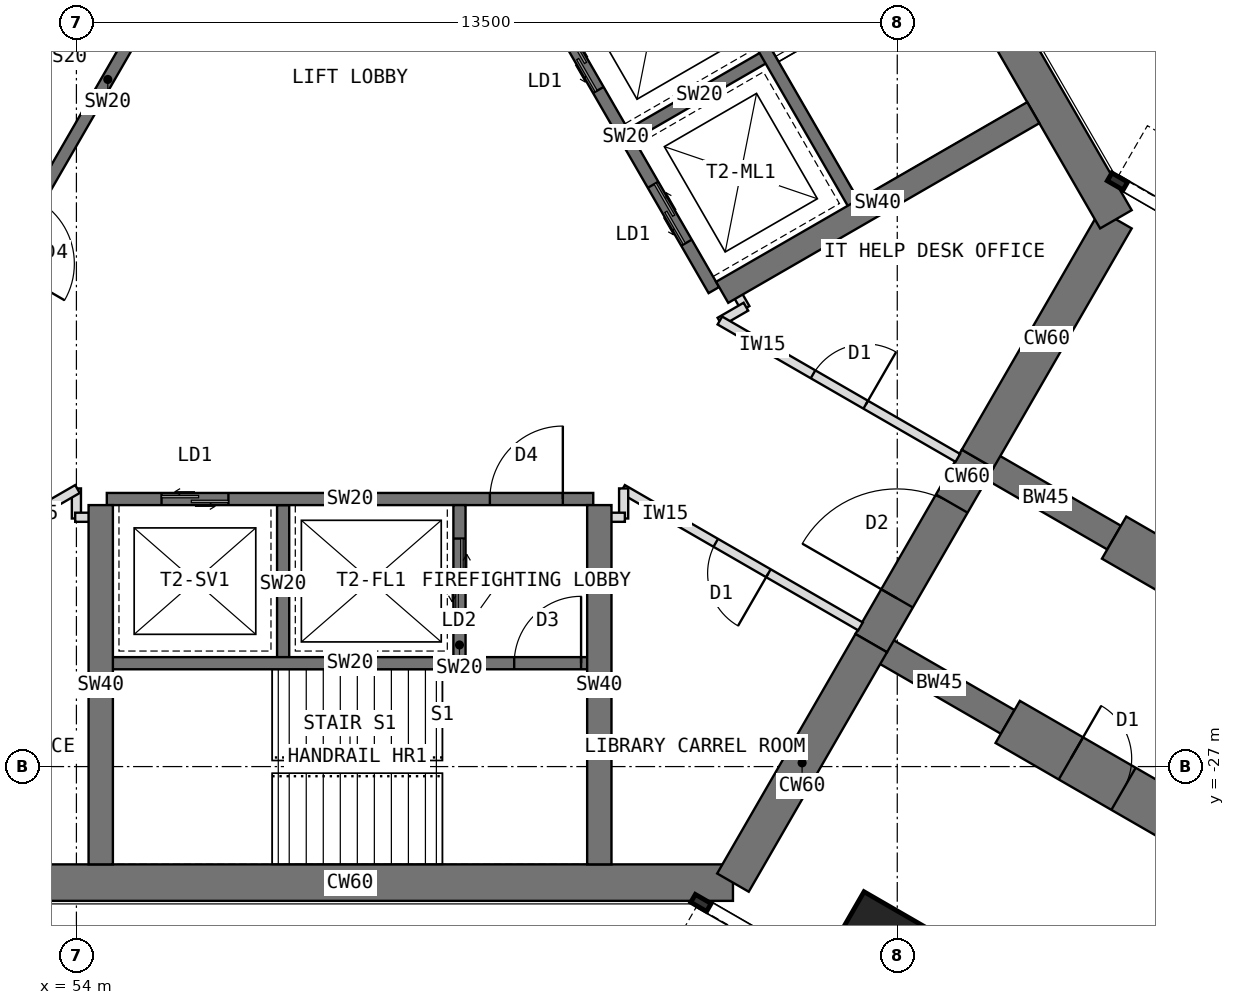
"""IFC4 building model, lengths in metres.
Left out: names, types, materials, properties, quantities, classifications, styles, units other than length and angle.
Written with IfcOpenShell. Run it as: python <this file> out.ifc"""

import sys

from ifc_helpers import new_model, si_unit, direction, frame, frame_2d, origin, origin_2d, place, context, subcontext, project, spatial, rectangle, extrude, element, fill, save


model = new_model("IFC4")
c1 = context("Model", 3, precision=1e-05, world=origin(), true_north=direction((0.0, 1.0)))
c2 = subcontext(c1, "Body", "Model", "MODEL_VIEW")
j1 = project(units=[si_unit("LENGTHUNIT", "METRE"), si_unit("PLANEANGLEUNIT", "RADIAN")], contexts=[c1])
p1 = place(None, origin())
s1 = spatial("IfcSite", under=j1, at=p1, CompositionType="ELEMENT")
p2 = place(p1, origin())
s2 = spatial("IfcBuilding", under=s1, at=p2, CompositionType="ELEMENT")
p3 = place(p2, frame((0.0, 0.0, 125.5)))
s3 = spatial("IfcBuildingStorey", under=s2, at=p3, CompositionType="ELEMENT", Elevation=125.5)
p4 = place(p3, frame((52.202, -28.908, 0.0), z_axis=(0.0, 0.0, 1.0), x_axis=(1.0, 0.0, 0.0)))
e1 = element("IfcWall", 1, at=p4, inside=s3, PredefinedType="SHEAR", context=c2, shape_type="SweptSolid", body=[
    extrude(rectangle(XDim=12.596, YDim=0.6, at=frame_2d((6.298, 0.0))), origin(), (0.0, 0.0, 1.0), 4.0),
])
p5 = place(p3, frame((64.798, -28.908, 0.0), z_axis=(0.0, 0.0, 1.0), x_axis=(0.499984222037, 0.866034513004, 0.0)))
e2 = element("IfcWall", 2, at=p5, inside=s3, PredefinedType="SHEAR", context=c2, shape_type="SweptSolid", body=[
    extrude(rectangle(XDim=4.548, YDim=0.6, at=frame_2d((2.274, 0.0))), origin(), (0.0, 0.0, 1.0), 4.0),
])
p6 = place(p3, frame((67.072, -24.97, 0.0), z_axis=(0.0, 0.0, 1.0), x_axis=(0.500010275428, 0.866019471182, 0.0)))
e3 = element("IfcWall", 3, at=p6, inside=s3, PredefinedType="SHEAR", context=c2, shape_type="SweptSolid", body=[
    extrude(rectangle(XDim=3.5, YDim=0.6, at=frame_2d((1.75, 0.0))), origin(), (0.0, 0.0, 1.0), 4.0),
])
p7 = place(p6, frame((0.85, 0.0, 0.0)))
e4 = element("IfcOpeningElement", 4, at=p7, cuts=e3, PredefinedType="OPENING", context=c2, shape_type="SweptSolid", body=[
    extrude(rectangle(XDim=1.8, YDim=2.1, at=frame_2d((0.9, 1.05))), frame((0.0, 0.31, 0.0), z_axis=(0.0, -1.0, 0.0), x_axis=(1.0, 0.0, 0.0)), (0.0, 0.0, 1.0), 0.62),
])
p8 = place(p3, frame((68.822, -21.939, 0.0), z_axis=(0.0, 0.0, 1.0), x_axis=(0.500024481964, 0.866011268655, 0.0)))
e5 = element("IfcWall", 5, at=p8, inside=s3, PredefinedType="SHEAR", context=c2, shape_type="SweptSolid", body=[
    extrude(rectangle(XDim=4.548, YDim=0.6, at=frame_2d((2.274, 0.0))), origin(), (0.0, 0.0, 1.0), 4.0),
])
p9 = place(p3, frame((71.096, -18.0, 0.0), z_axis=(0.0, 0.0, 1.0), x_axis=(-0.500005998175, 0.866021940709, 0.0)))
e6 = element("IfcWall", 6, at=p9, inside=s3, PredefinedType="SHEAR", context=c2, shape_type="SweptSolid", body=[
    extrude(rectangle(XDim=12.596, YDim=0.6, at=frame_2d((6.298, 0.0))), origin(), (0.0, 0.0, 1.0), 4.0),
])
p10 = place(p3, frame((68.822, -21.939, 0.0), z_axis=(0.0, 0.0, 1.0), x_axis=(0.866072649678, -0.499918158782, 0.0)))
e7 = element("IfcWall", 7, at=p10, inside=s3, PredefinedType="SHEAR", context=c2, shape_type="SweptSolid", body=[
    extrude(rectangle(XDim=2.592, YDim=0.45, at=frame_2d((1.296, 0.0))), origin(), (0.0, 0.0, 1.0), 4.0),
])
p11 = place(p3, frame((71.066, -23.234, 0.0), z_axis=(0.0, 0.0, 1.0), x_axis=(0.86602681393, -0.499997557548, 0.0)))
e8 = element("IfcWall", 8, at=p11, inside=s3, PredefinedType="SHEAR", context=c2, shape_type="SweptSolid", body=[
    extrude(rectangle(XDim=9.5, YDim=0.8, at=frame_2d((4.75, 0.0))), origin(), (0.0, 0.0, 1.0), 4.0),
])
p12 = place(p11, frame((1.2, 0.0, 0.0)))
e9 = element("IfcOpeningElement", 9, at=p12, cuts=e8, PredefinedType="OPENING", context=c2, shape_type="SweptSolid", body=[
    extrude(rectangle(XDim=1.0, YDim=2.1, at=frame_2d((0.5, 1.05))), frame((0.0, 0.41, 0.0), z_axis=(0.0, -1.0, 0.0), x_axis=(1.0, 0.0, 0.0)), (0.0, 0.0, 1.0), 0.82),
])
p13 = place(p3, frame((67.072, -24.97, 0.0), z_axis=(0.0, 0.0, 1.0), x_axis=(0.866031863473, -0.499988811324, 0.0)))
e10 = element("IfcWall", 10, at=p13, inside=s3, PredefinedType="SHEAR", context=c2, shape_type="SweptSolid", body=[
    extrude(rectangle(XDim=2.592, YDim=0.45, at=frame_2d((1.296, 0.0))), origin(), (0.0, 0.0, 1.0), 4.0),
])
p14 = place(p3, frame((69.316, -26.266, 0.0), z_axis=(0.0, 0.0, 1.0), x_axis=(0.86602681393, -0.499997557548, 0.0)))
e11 = element("IfcWall", 11, at=p14, inside=s3, PredefinedType="SHEAR", context=c2, shape_type="SweptSolid", body=[
    extrude(rectangle(XDim=9.5, YDim=0.8, at=frame_2d((4.75, 0.0))), origin(), (0.0, 0.0, 1.0), 4.0),
])
p15 = place(p14, frame((1.2, 0.0, 0.0)))
e12 = element("IfcOpeningElement", 12, at=p15, cuts=e11, PredefinedType="OPENING", context=c2, shape_type="SweptSolid", body=[
    extrude(rectangle(XDim=1.0, YDim=2.1, at=frame_2d((0.5, 1.05))), frame((0.0, 0.41, 0.0), z_axis=(0.0, -1.0, 0.0), x_axis=(1.0, 0.0, 0.0)), (0.0, 0.0, 1.0), 0.82),
])
p16 = place(p3, frame((67.191, -29.946, 0.0), z_axis=(0.0, 0.0, 1.0), x_axis=(0.5, 0.866025403784, 0.0)))
e13 = element("IfcColumn", 13, at=p16, inside=s3, PredefinedType="COLUMN", context=c2, shape_type="SweptSolid", body=[
    extrude(rectangle(XDim=1.3, YDim=1.3, at=origin_2d()), origin(), (0.0, 0.0, 1.0), 4.0),
])
p17 = place(p3, frame((56.516, -12.236, 0.0), z_axis=(0.0, 0.0, 1.0), x_axis=(-0.49999894854, -0.866026010844, 0.0)))
e14 = element("IfcWall", 14, at=p17, inside=s3, PredefinedType="SHEAR", context=c2, shape_type="SweptSolid", body=[
    extrude(rectangle(XDim=8.0, YDim=0.2, at=frame_2d((4.0, 0.0))), origin(), (0.0, 0.0, 1.0), 4.0),
])
p18 = place(p17, frame((6.3, 0.0, 0.0)))
e15 = element("IfcOpeningElement", 15, at=p18, cuts=e14, PredefinedType="OPENING", context=c2, shape_type="SweptSolid", body=[
    extrude(rectangle(XDim=1.2, YDim=2.1, at=frame_2d((0.6, 1.05))), frame((0.0, 0.11, 0.0), z_axis=(0.0, -1.0, 0.0), x_axis=(1.0, 0.0, 0.0)), (0.0, 0.0, 1.0), 0.22),
])
p19 = place(p3, frame((54.178, -10.886, 0.0), z_axis=(0.0, 0.0, 1.0), x_axis=(-0.49999894854, -0.866026010844, 0.0)))
e16 = element("IfcWall", 16, at=p19, inside=s3, PredefinedType="SHEAR", context=c2, shape_type="SweptSolid", body=[
    extrude(rectangle(XDim=8.0, YDim=0.2, at=frame_2d((4.0, 0.0))), origin(), (0.0, 0.0, 1.0), 4.0),
])
p20 = place(p19, frame((6.8, 0.0, 0.0)))
e17 = element("IfcOpeningElement", 17, at=p20, cuts=e16, PredefinedType="OPENING", context=c2, shape_type="SweptSolid", body=[
    extrude(rectangle(XDim=0.9, YDim=2.1, at=frame_2d((0.45, 1.05))), frame((0.0, 0.11, 0.0), z_axis=(0.0, -1.0, 0.0), x_axis=(1.0, 0.0, 0.0)), (0.0, 0.0, 1.0), 0.22),
])
p21 = place(p3, frame((54.5, -22.6, 0.0), z_axis=(0.0, 0.0, 1.0), x_axis=(1.0, 0.0, 0.0)))
e18 = element("IfcWall", 18, at=p21, inside=s3, PredefinedType="SHEAR", context=c2, shape_type="SweptSolid", body=[
    extrude(rectangle(XDim=8.0, YDim=0.2, at=frame_2d((4.0, 0.0))), origin(), (0.0, 0.0, 1.0), 4.0),
])
p22 = place(p21, frame((6.3, 0.0, 0.0)))
e19 = element("IfcOpeningElement", 19, at=p22, cuts=e18, PredefinedType="OPENING", context=c2, shape_type="SweptSolid", body=[
    extrude(rectangle(XDim=1.2, YDim=2.1, at=frame_2d((0.6, 1.05))), frame((0.0, 0.11, 0.0), z_axis=(0.0, -1.0, 0.0), x_axis=(1.0, 0.0, 0.0)), (0.0, 0.0, 1.0), 0.22),
])
p23 = place(p21, frame((0.9, 0.0, 0.0)))
e20 = element("IfcOpeningElement", 20, at=p23, cuts=e18, PredefinedType="OPENING", context=c2, shape_type="SweptSolid", body=[
    extrude(rectangle(XDim=1.1, YDim=2.2, at=frame_2d((0.55, 1.1))), frame((0.0, 0.11, 0.0), z_axis=(0.0, -1.0, 0.0), x_axis=(1.0, 0.0, 0.0)), (0.0, 0.0, 1.0), 0.22),
])
p24 = place(p3, frame((57.4, -22.7, 0.0), z_axis=(0.0, 0.0, 1.0), x_axis=(0.0, -1.0, 0.0)))
e21 = element("IfcWall", 21, at=p24, inside=s3, PredefinedType="SHEAR", context=c2, shape_type="SweptSolid", body=[
    extrude(rectangle(XDim=2.6, YDim=0.2, at=frame_2d((1.3, 0.0))), origin(), (0.0, 0.0, 1.0), 4.0),
])
p25 = place(p3, frame((60.3, -22.7, 0.0), z_axis=(0.0, 0.0, 1.0), x_axis=(0.0, -1.0, 0.0)))
e22 = element("IfcWall", 22, at=p25, inside=s3, PredefinedType="SHEAR", context=c2, shape_type="SweptSolid", body=[
    extrude(rectangle(XDim=2.6, YDim=0.2, at=frame_2d((1.3, 0.0))), origin(), (0.0, 0.0, 1.0), 4.0),
])
p26 = place(p25, frame((0.55, 0.0, 0.0)))
e23 = element("IfcOpeningElement", 23, at=p26, cuts=e22, PredefinedType="OPENING", context=c2, shape_type="SweptSolid", body=[
    extrude(rectangle(XDim=1.3, YDim=2.2, at=frame_2d((0.65, 1.1))), frame((0.0, 0.11, 0.0), z_axis=(0.0, -1.0, 0.0), x_axis=(1.0, 0.0, 0.0)), (0.0, 0.0, 1.0), 0.22),
])
p27 = place(p3, frame((54.5, -25.3, 0.0), z_axis=(0.0, 0.0, 1.0), x_axis=(1.0, 0.0, 0.0)))
e24 = element("IfcWall", 24, at=p27, inside=s3, PredefinedType="SHEAR", context=c2, shape_type="SweptSolid", body=[
    extrude(rectangle(XDim=8.0, YDim=0.2, at=frame_2d((4.0, 0.0))), origin(), (0.0, 0.0, 1.0), 4.0),
])
p28 = place(p27, frame((6.7, 0.0, 0.0)))
e25 = element("IfcOpeningElement", 25, at=p28, cuts=e24, PredefinedType="OPENING", context=c2, shape_type="SweptSolid", body=[
    extrude(rectangle(XDim=1.1, YDim=2.1, at=frame_2d((0.55, 1.05))), frame((0.0, 0.11, 0.0), z_axis=(0.0, -1.0, 0.0), x_axis=(1.0, 0.0, 0.0)), (0.0, 0.0, 1.0), 0.22),
])
for number, where, z_axis, x_axis in (
    (26, (62.6, -22.7, 0.0), (0.0, 0.0, 1.0), (0.0, -1.0, 0.0)),
    (27, (54.4, -22.7, 0.0), (0.0, 0.0, 1.0), (0.0, -1.0, 0.0)),
):
    element("IfcWall", number, at=place(p3, frame(where, z_axis=z_axis, x_axis=x_axis)), inside=s3, PredefinedType="SHEAR", context=c2, shape_type="SweptSolid", body=[
        extrude(rectangle(XDim=5.908, YDim=0.4, at=frame_2d((2.954, 0.0))), origin(), (0.0, 0.0, 1.0), 4.0),
    ])
p29 = place(p3, frame((64.484, -19.164, 0.0), z_axis=(0.0, 0.0, 1.0), x_axis=(-0.49999894854, 0.866026010844, 0.0)))
e28 = element("IfcWall", 28, at=p29, inside=s3, PredefinedType="SHEAR", context=c2, shape_type="SweptSolid", body=[
    extrude(rectangle(XDim=8.0, YDim=0.2, at=frame_2d((4.0, 0.0))), origin(), (0.0, 0.0, 1.0), 4.0),
])
p30 = place(p29, frame((6.3, 0.0, 0.0)))
e29 = element("IfcOpeningElement", 29, at=p30, cuts=e28, PredefinedType="OPENING", context=c2, shape_type="SweptSolid", body=[
    extrude(rectangle(XDim=1.2, YDim=2.1, at=frame_2d((0.6, 1.05))), frame((0.0, 0.11, 0.0), z_axis=(0.0, -1.0, 0.0), x_axis=(1.0, 0.0, 0.0)), (0.0, 0.0, 1.0), 0.22),
])
p31 = place(p29, frame((0.9, 0.0, 0.0)))
e30 = element("IfcOpeningElement", 30, at=p31, cuts=e28, PredefinedType="OPENING", context=c2, shape_type="SweptSolid", body=[
    extrude(rectangle(XDim=1.1, YDim=2.2, at=frame_2d((0.55, 1.1))), frame((0.0, 0.11, 0.0), z_axis=(0.0, -1.0, 0.0), x_axis=(1.0, 0.0, 0.0)), (0.0, 0.0, 1.0), 0.22),
])
p32 = place(p29, frame((3.8, 0.0, 0.0)))
e31 = element("IfcOpeningElement", 31, at=p32, cuts=e28, PredefinedType="OPENING", context=c2, shape_type="SweptSolid", body=[
    extrude(rectangle(XDim=1.1, YDim=2.2, at=frame_2d((0.55, 1.1))), frame((0.0, 0.11, 0.0), z_axis=(0.0, -1.0, 0.0), x_axis=(1.0, 0.0, 0.0)), (0.0, 0.0, 1.0), 0.22),
])
p33 = place(p3, frame((63.12, -16.603, 0.0), z_axis=(0.0, 0.0, 1.0), x_axis=(0.866062058628, 0.499936506574, 0.0)))
e32 = element("IfcWall", 32, at=p33, inside=s3, PredefinedType="SHEAR", context=c2, shape_type="SweptSolid", body=[
    extrude(rectangle(XDim=2.6, YDim=0.2, at=frame_2d((1.3, 0.0))), origin(), (0.0, 0.0, 1.0), 4.0),
])
p34 = place(p3, frame((66.822, -17.814, 0.0), z_axis=(0.0, 0.0, 1.0), x_axis=(-0.49999894854, 0.866026010844, 0.0)))
e33 = element("IfcWall", 33, at=p34, inside=s3, PredefinedType="SHEAR", context=c2, shape_type="SweptSolid", body=[
    extrude(rectangle(XDim=8.0, YDim=0.2, at=frame_2d((4.0, 0.0))), origin(), (0.0, 0.0, 1.0), 4.0),
])
p35 = place(p34, frame((6.7, 0.0, 0.0)))
e34 = element("IfcOpeningElement", 34, at=p35, cuts=e33, PredefinedType="OPENING", context=c2, shape_type="SweptSolid", body=[
    extrude(rectangle(XDim=1.1, YDim=2.1, at=frame_2d((0.55, 1.05))), frame((0.0, 0.11, 0.0), z_axis=(0.0, -1.0, 0.0), x_axis=(1.0, 0.0, 0.0)), (0.0, 0.0, 1.0), 0.22),
])
p36 = place(p3, frame((64.62, -19.201, 0.0), z_axis=(0.0, 0.0, 1.0), x_axis=(0.866027317282, 0.49999668571, 0.0)))
e35 = element("IfcWall", 35, at=p36, inside=s3, PredefinedType="SHEAR", context=c2, shape_type="SweptSolid", body=[
    extrude(rectangle(XDim=5.908, YDim=0.4, at=frame_2d((2.954, 0.0))), origin(), (0.0, 0.0, 1.0), 4.0),
])
p37 = place(p3, frame((54.0, -22.92, 0.0), z_axis=(0.0, 0.0, 1.0), x_axis=(0.0, 1.0, 0.0)))
e36 = element("IfcWall", 36, at=p37, inside=s3, PredefinedType="PARTITIONING", context=c2, shape_type="SweptSolid", body=[
    extrude(rectangle(XDim=0.494, YDim=0.15, at=frame_2d((0.247, 0.0))), origin(), (0.0, 0.0, 1.0), 3.8),
])
p38 = place(p3, frame((54.017, -22.436, 0.0), z_axis=(0.0, 0.0, 1.0), x_axis=(-0.86602002524, -0.500009315796, 0.0)))
e37 = element("IfcWall", 37, at=p38, inside=s3, PredefinedType="PARTITIONING", context=c2, shape_type="SweptSolid", body=[
    extrude(rectangle(XDim=4.519, YDim=0.15, at=frame_2d((2.259, 0.0))), origin(), (0.0, 0.0, 1.0), 3.8),
])
p39 = place(p38, frame((1.769, 0.0, 0.0)))
e38 = element("IfcOpeningElement", 38, at=p39, cuts=e37, PredefinedType="OPENING", context=c2, shape_type="SweptSolid", body=[
    extrude(rectangle(XDim=1.0, YDim=2.1, at=frame_2d((0.5, 1.05))), frame((0.0, 0.085, 0.0), z_axis=(0.0, -1.0, 0.0), x_axis=(1.0, 0.0, 0.0)), (0.0, 0.0, 1.0), 0.17),
])
p40 = place(p3, frame((64.789, -19.092, 0.0), z_axis=(0.0, 0.0, 1.0), x_axis=(0.499804398801, -0.866138304741, 0.0)))
e39 = element("IfcWall", 39, at=p40, inside=s3, PredefinedType="PARTITIONING", context=c2, shape_type="SweptSolid", body=[
    extrude(rectangle(XDim=0.43, YDim=0.15, at=frame_2d((0.215, 0.0))), origin(), (0.0, 0.0, 1.0), 3.8),
])
p41 = place(p3, frame((65.011, -19.437, 0.0), z_axis=(0.0, 0.0, 1.0), x_axis=(-0.865831790172, -0.50033519877, 0.0)))
e40 = element("IfcWall", 40, at=p41, inside=s3, PredefinedType="PARTITIONING", context=c2, shape_type="SweptSolid", body=[
    extrude(rectangle(XDim=0.494, YDim=0.15, at=frame_2d((0.247, 0.0))), origin(), (0.0, 0.0, 1.0), 3.8),
])
p42 = place(p3, frame((64.583, -19.664, 0.0), z_axis=(0.0, 0.0, 1.0), x_axis=(0.866006515865, -0.500032713409, 0.0)))
e41 = element("IfcWall", 41, at=p42, inside=s3, PredefinedType="PARTITIONING", context=c2, shape_type="SweptSolid", body=[
    extrude(rectangle(XDim=4.518, YDim=0.15, at=frame_2d((2.259, 0.0))), origin(), (0.0, 0.0, 1.0), 3.8),
])
p43 = place(p42, frame((1.769, 0.0, 0.0)))
e42 = element("IfcOpeningElement", 42, at=p43, cuts=e41, PredefinedType="OPENING", context=c2, shape_type="SweptSolid", body=[
    extrude(rectangle(XDim=1.0, YDim=2.1, at=frame_2d((0.5, 1.05))), frame((0.0, 0.085, 0.0), z_axis=(0.0, -1.0, 0.0), x_axis=(1.0, 0.0, 0.0)), (0.0, 0.0, 1.0), 0.17),
])
p44 = place(p3, frame((66.896, -24.695, 0.0), z_axis=(0.0, 0.0, 1.0), x_axis=(-0.86602002524, 0.500009315796, 0.0)))
e43 = element("IfcWall", 43, at=p44, inside=s3, PredefinedType="PARTITIONING", context=c2, shape_type="SweptSolid", body=[
    extrude(rectangle(XDim=4.519, YDim=0.15, at=frame_2d((2.259, 0.0))), origin(), (0.0, 0.0, 1.0), 3.8),
])
p45 = place(p44, frame((1.749, 0.0, 0.0)))
e44 = element("IfcOpeningElement", 44, at=p45, cuts=e43, PredefinedType="OPENING", context=c2, shape_type="SweptSolid", body=[
    extrude(rectangle(XDim=1.0, YDim=2.1, at=frame_2d((0.5, 1.05))), frame((0.0, 0.085, 0.0), z_axis=(0.0, -1.0, 0.0), x_axis=(1.0, 0.0, 0.0)), (0.0, 0.0, 1.0), 0.17),
])
p46 = place(p3, frame((63.0, -22.426, 0.0), z_axis=(0.0, 0.0, 1.0), x_axis=(0.0, -1.0, 0.0)))
e45 = element("IfcWall", 45, at=p46, inside=s3, PredefinedType="PARTITIONING", context=c2, shape_type="SweptSolid", body=[
    extrude(rectangle(XDim=0.494, YDim=0.15, at=frame_2d((0.247, 0.0))), origin(), (0.0, 0.0, 1.0), 3.8),
])
for number, where, z_axis, x_axis in (
    (46, (63.02, -22.9, 0.0), (0.0, 0.0, 1.0), (-1.0, 0.0, 0.0)),
    (47, (54.41, -22.9, 0.0), (0.0, 0.0, 1.0), (-1.0, 0.0, 0.0)),
):
    element("IfcWall", number, at=place(p3, frame(where, z_axis=z_axis, x_axis=x_axis)), inside=s3, PredefinedType="PARTITIONING", context=c2, shape_type="SweptSolid", body=[
        extrude(rectangle(XDim=0.43, YDim=0.15, at=frame_2d((0.215, 0.0))), origin(), (0.0, 0.0, 1.0), 3.8),
    ])
p47 = place(p22, origin())
e48 = element("IfcDoor", 48, at=p47, inside=s3, OperationType="SINGLE_SWING_RIGHT", PredefinedType="DOOR", context=c2, shape_type="SweptSolid", body=[
    extrude(rectangle(XDim=1.2, YDim=2.1, at=frame_2d((0.6, 1.05))), frame((0.0, 0.025, 0.0), z_axis=(0.0, -1.0, 0.0), x_axis=(1.0, 0.0, 0.0)), (0.0, 0.0, 1.0), 0.05),
])
fill(e19, e48)
p48 = place(p26, origin())
e49 = element("IfcDoor", 49, at=p48, inside=s3, OperationType="DOUBLE_DOOR_SLIDING", PredefinedType="DOOR", context=c2, shape_type="SweptSolid", body=[
    extrude(rectangle(XDim=1.3, YDim=2.2, at=frame_2d((0.65, 1.1))), frame((0.0, 0.025, 0.0), z_axis=(0.0, -1.0, 0.0), x_axis=(1.0, 0.0, 0.0)), (0.0, 0.0, 1.0), 0.05),
])
fill(e23, e49)
p49 = place(p23, origin())
e50 = element("IfcDoor", 50, at=p49, inside=s3, OperationType="DOUBLE_DOOR_SLIDING", PredefinedType="DOOR", context=c2, shape_type="SweptSolid", body=[
    extrude(rectangle(XDim=1.1, YDim=2.2, at=frame_2d((0.55, 1.1))), frame((0.0, 0.025, 0.0), z_axis=(0.0, -1.0, 0.0), x_axis=(1.0, 0.0, 0.0)), (0.0, 0.0, 1.0), 0.05),
])
fill(e20, e50)
p50 = place(p28, origin())
e51 = element("IfcDoor", 51, at=p50, inside=s3, OperationType="SINGLE_SWING_RIGHT", PredefinedType="DOOR", context=c2, shape_type="SweptSolid", body=[
    extrude(rectangle(XDim=1.1, YDim=2.1, at=frame_2d((0.55, 1.05))), frame((0.0, 0.025, 0.0), z_axis=(0.0, -1.0, 0.0), x_axis=(1.0, 0.0, 0.0)), (0.0, 0.0, 1.0), 0.05),
])
fill(e25, e51)
p51 = place(p31, origin())
e52 = element("IfcDoor", 52, at=p51, inside=s3, OperationType="DOUBLE_DOOR_SLIDING", PredefinedType="DOOR", context=c2, shape_type="SweptSolid", body=[
    extrude(rectangle(XDim=1.1, YDim=2.2, at=frame_2d((0.55, 1.1))), frame((0.0, 0.025, 0.0), z_axis=(0.0, -1.0, 0.0), x_axis=(1.0, 0.0, 0.0)), (0.0, 0.0, 1.0), 0.05),
])
fill(e30, e52)
p52 = place(p32, origin())
e53 = element("IfcDoor", 53, at=p52, inside=s3, OperationType="DOUBLE_DOOR_SLIDING", PredefinedType="DOOR", context=c2, shape_type="SweptSolid", body=[
    extrude(rectangle(XDim=1.1, YDim=2.2, at=frame_2d((0.55, 1.1))), frame((0.0, 0.025, 0.0), z_axis=(0.0, -1.0, 0.0), x_axis=(1.0, 0.0, 0.0)), (0.0, 0.0, 1.0), 0.05),
])
fill(e31, e53)
p53 = place(p7, origin())
e54 = element("IfcDoor", 54, at=p53, inside=s3, OperationType="DOUBLE_DOOR_DOUBLE_SWING", PredefinedType="DOOR", context=c2, shape_type="SweptSolid", body=[
    extrude(rectangle(XDim=1.72, YDim=2.06, at=frame_2d((0.9, 1.03))), frame((0.0, 0.025, 0.0), z_axis=(0.0, -1.0, 0.0), x_axis=(1.0, 0.0, 0.0)), (0.0, 0.0, 1.0), 0.05),
    extrude(rectangle(XDim=0.04, YDim=2.1, at=frame_2d((0.02, 1.05))), frame((0.0, 0.3, 0.0), z_axis=(0.0, -1.0, 0.0), x_axis=(1.0, 0.0, 0.0)), (0.0, 0.0, 1.0), 0.6),
    extrude(rectangle(XDim=0.04, YDim=2.1, at=frame_2d((1.78, 1.05))), frame((0.0, 0.3, 0.0), z_axis=(0.0, -1.0, 0.0), x_axis=(1.0, 0.0, 0.0)), (0.0, 0.0, 1.0), 0.6),
    extrude(rectangle(XDim=1.72, YDim=0.04, at=frame_2d((0.9, 2.08))), frame((0.0, 0.3, 0.0), z_axis=(0.0, -1.0, 0.0), x_axis=(1.0, 0.0, 0.0)), (0.0, 0.0, 1.0), 0.6),
])
fill(e4, e54)
p54 = place(p45, origin())
e55 = element("IfcDoor", 55, at=p54, inside=s3, OperationType="SINGLE_SWING_LEFT", PredefinedType="DOOR", context=c2, shape_type="SweptSolid", body=[
    extrude(rectangle(XDim=1.0, YDim=2.1, at=frame_2d((0.5, 1.05))), frame((0.0, 0.025, 0.0), z_axis=(0.0, -1.0, 0.0), x_axis=(1.0, 0.0, 0.0)), (0.0, 0.0, 1.0), 0.05),
])
fill(e44, e55)
p55 = place(p43, origin())
e56 = element("IfcDoor", 56, at=p55, inside=s3, OperationType="SINGLE_SWING_RIGHT", PredefinedType="DOOR", context=c2, shape_type="SweptSolid", body=[
    extrude(rectangle(XDim=1.0, YDim=2.1, at=frame_2d((0.5, 1.05))), frame((0.0, 0.025, 0.0), z_axis=(0.0, -1.0, 0.0), x_axis=(1.0, 0.0, 0.0)), (0.0, 0.0, 1.0), 0.05),
])
fill(e42, e56)
p56 = place(p15, origin())
e57 = element("IfcDoor", 57, at=p56, inside=s3, OperationType="SINGLE_SWING_LEFT", PredefinedType="DOOR", context=c2, shape_type="SweptSolid", body=[
    extrude(rectangle(XDim=0.92, YDim=2.06, at=frame_2d((0.5, 1.03))), frame((0.0, 0.025, 0.0), z_axis=(0.0, -1.0, 0.0), x_axis=(1.0, 0.0, 0.0)), (0.0, 0.0, 1.0), 0.05),
    extrude(rectangle(XDim=0.04, YDim=2.1, at=frame_2d((0.02, 1.05))), frame((0.0, 0.4, 0.0), z_axis=(0.0, -1.0, 0.0), x_axis=(1.0, 0.0, 0.0)), (0.0, 0.0, 1.0), 0.8),
    extrude(rectangle(XDim=0.04, YDim=2.1, at=frame_2d((0.98, 1.05))), frame((0.0, 0.4, 0.0), z_axis=(0.0, -1.0, 0.0), x_axis=(1.0, 0.0, 0.0)), (0.0, 0.0, 1.0), 0.8),
    extrude(rectangle(XDim=0.92, YDim=0.04, at=frame_2d((0.5, 2.08))), frame((0.0, 0.4, 0.0), z_axis=(0.0, -1.0, 0.0), x_axis=(1.0, 0.0, 0.0)), (0.0, 0.0, 1.0), 0.8),
])
fill(e12, e57)
save(model, sys.argv[1])
